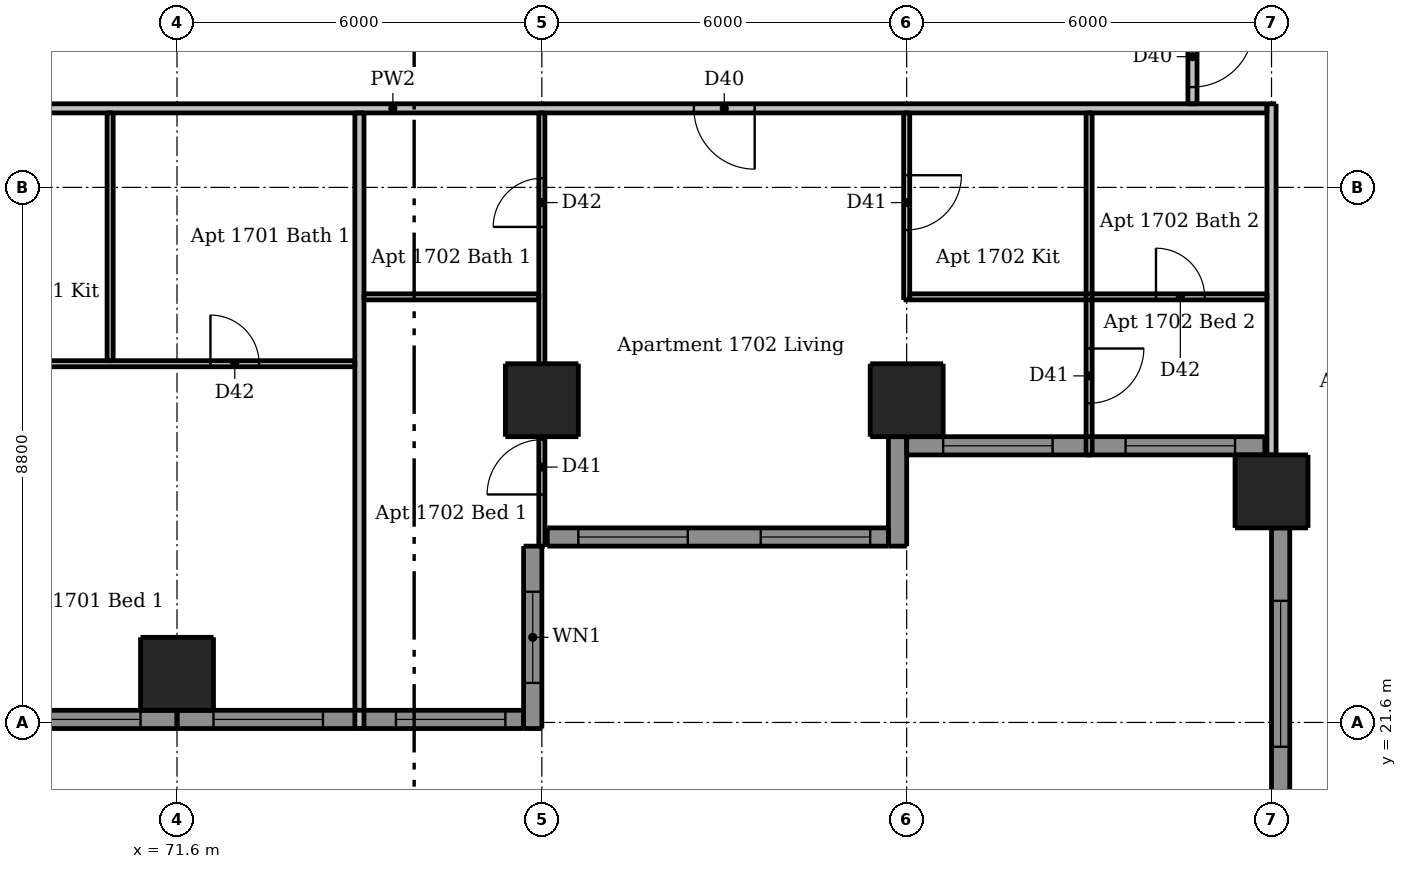
"""IFC4 building model, lengths in metres.
Left out: names, types, materials, properties, quantities, classifications, styles, units other than length and angle.
Written with IfcOpenShell. Run it as: python <this file> out.ifc"""

import sys

from ifc_helpers import new_model, si_unit, direction, frame, frame_2d, origin, origin_2d, place, context, subcontext, project, spatial, rectangle, extrude, element, fill, save


model = new_model("IFC4")
c1 = context("Model", 3, precision=1e-05, world=origin(), true_north=direction((0.0, 1.0)))
c2 = subcontext(c1, "Body", "Model", "MODEL_VIEW")
j1 = project(units=[si_unit("LENGTHUNIT", "METRE"), si_unit("PLANEANGLEUNIT", "RADIAN")], contexts=[c1])
p1 = place(None, origin())
s1 = spatial("IfcSite", under=j1, at=p1, CompositionType="ELEMENT")
p2 = place(p1, origin())
s2 = spatial("IfcBuilding", under=s1, at=p2, CompositionType="ELEMENT")
p3 = place(p2, frame((0.0, 0.0, 63.1)))
s3 = spatial("IfcBuildingStorey", under=s2, at=p3, CompositionType="ELEMENT", Elevation=63.1)
for number, where, z_axis, x_axis in (
    (1, (71.6, 22.4, 0.0), (0.0, 0.0, 1.0), (1.0, 0.0, 0.0)),
    (2, (77.6, 26.9, 0.0), (0.0, 0.0, 1.0), (1.0, 0.0, 0.0)),
    (3, (83.6, 26.9, 0.0), (0.0, 0.0, 1.0), (1.0, 0.0, 0.0)),
    (4, (89.6, 25.4, 0.0), (0.0, 0.0, 1.0), (1.0, 0.0, 0.0)),
):
    element("IfcColumn", number, at=place(p3, frame(where, z_axis=z_axis, x_axis=x_axis)), inside=s3, PredefinedType="COLUMN", context=c2, shape_type="SweptSolid", body=[
        extrude(rectangle(XDim=1.2, YDim=1.2, at=origin_2d()), origin(), (0.0, 0.0, 1.0), 3.05),
    ])
p4 = place(p3, frame((77.45, 21.5, 0.0), z_axis=(0.0, 0.0, 1.0), x_axis=(0.0, 1.0, 0.0)))
e5 = element("IfcWall", 5, at=p4, inside=s3, PredefinedType="SOLIDWALL", context=c2, shape_type="SweptSolid", body=[
    extrude(rectangle(XDim=3.0, YDim=0.3, at=frame_2d((1.5, 0.0))), origin(), (0.0, 0.0, 1.0), 3.05),
])
p5 = place(p4, frame((0.75, 0.0, 0.9)))
e6 = element("IfcOpeningElement", 6, at=p5, cuts=e5, PredefinedType="OPENING", context=c2, shape_type="SweptSolid", body=[
    extrude(rectangle(XDim=1.5, YDim=1.5, at=frame_2d((0.75, 0.75))), frame((0.0, 0.16, 0.0), z_axis=(0.0, -1.0, 0.0), x_axis=(1.0, 0.0, 0.0)), (0.0, 0.0, 1.0), 0.32),
])
p6 = place(p3, frame((83.45, 24.5, 0.0), z_axis=(0.0, 0.0, 1.0), x_axis=(0.0, 1.0, 0.0)))
e7 = element("IfcWall", 7, at=p6, inside=s3, PredefinedType="SOLIDWALL", context=c2, shape_type="SweptSolid", body=[
    extrude(rectangle(XDim=1.8, YDim=0.3, at=frame_2d((0.9, 0.0))), origin(), (0.0, 0.0, 1.0), 3.05),
])
p7 = place(p3, frame((89.75, 24.8, 0.0), z_axis=(0.0, 0.0, 1.0), x_axis=(0.0, -1.0, 0.0)))
e8 = element("IfcWall", 8, at=p7, inside=s3, PredefinedType="SOLIDWALL", context=c2, shape_type="SweptSolid", body=[
    extrude(rectangle(XDim=4.8, YDim=0.3, at=frame_2d((2.4, 0.0))), origin(), (0.0, 0.0, 1.0), 3.05),
])
p8 = place(p7, frame((1.2, 0.0, 0.15)))
e9 = element("IfcOpeningElement", 9, at=p8, cuts=e8, PredefinedType="OPENING", context=c2, shape_type="SweptSolid", body=[
    extrude(rectangle(XDim=2.4, YDim=2.1, at=frame_2d((1.2, 1.05))), frame((0.0, 0.16, 0.0), z_axis=(0.0, -1.0, 0.0), x_axis=(1.0, 0.0, 0.0)), (0.0, 0.0, 1.0), 0.32),
])
p9 = place(p3, frame((65.6, 21.65, 0.0), z_axis=(0.0, 0.0, 1.0), x_axis=(1.0, 0.0, 0.0)))
e10 = element("IfcWall", 10, at=p9, inside=s3, PredefinedType="SOLIDWALL", context=c2, shape_type="SweptSolid", body=[
    extrude(rectangle(XDim=6.0, YDim=0.3, at=frame_2d((3.0, 0.0))), origin(), (0.0, 0.0, 1.0), 3.05),
])
p10 = place(p9, frame((0.6, 0.0, 0.15)))
e11 = element("IfcOpeningElement", 11, at=p10, cuts=e10, PredefinedType="OPENING", context=c2, shape_type="SweptSolid", body=[
    extrude(rectangle(XDim=1.8, YDim=2.1, at=frame_2d((0.9, 1.05))), frame((0.0, 0.16, 0.0), z_axis=(0.0, -1.0, 0.0), x_axis=(1.0, 0.0, 0.0)), (0.0, 0.0, 1.0), 0.32),
])
p11 = place(p9, frame((3.6, 0.0, 0.15)))
e12 = element("IfcOpeningElement", 12, at=p11, cuts=e10, PredefinedType="OPENING", context=c2, shape_type="SweptSolid", body=[
    extrude(rectangle(XDim=1.8, YDim=2.1, at=frame_2d((0.9, 1.05))), frame((0.0, 0.16, 0.0), z_axis=(0.0, -1.0, 0.0), x_axis=(1.0, 0.0, 0.0)), (0.0, 0.0, 1.0), 0.32),
])
p12 = place(p3, frame((71.6, 21.65, 0.0), z_axis=(0.0, 0.0, 1.0), x_axis=(1.0, 0.0, 0.0)))
e13 = element("IfcWall", 13, at=p12, inside=s3, PredefinedType="SOLIDWALL", context=c2, shape_type="SweptSolid", body=[
    extrude(rectangle(XDim=5.7, YDim=0.3, at=frame_2d((2.85, 0.0))), origin(), (0.0, 0.0, 1.0), 3.05),
])
p13 = place(p12, frame((0.6, 0.0, 0.15)))
e14 = element("IfcOpeningElement", 14, at=p13, cuts=e13, PredefinedType="OPENING", context=c2, shape_type="SweptSolid", body=[
    extrude(rectangle(XDim=1.8, YDim=2.1, at=frame_2d((0.9, 1.05))), frame((0.0, 0.16, 0.0), z_axis=(0.0, -1.0, 0.0), x_axis=(1.0, 0.0, 0.0)), (0.0, 0.0, 1.0), 0.32),
])
p14 = place(p12, frame((3.6, 0.0, 0.15)))
e15 = element("IfcOpeningElement", 15, at=p14, cuts=e13, PredefinedType="OPENING", context=c2, shape_type="SweptSolid", body=[
    extrude(rectangle(XDim=1.8, YDim=2.1, at=frame_2d((0.9, 1.05))), frame((0.0, 0.16, 0.0), z_axis=(0.0, -1.0, 0.0), x_axis=(1.0, 0.0, 0.0)), (0.0, 0.0, 1.0), 0.32),
])
p15 = place(p3, frame((77.69, 24.65, 0.0), z_axis=(0.0, 0.0, 1.0), x_axis=(1.0, 0.0, 0.0)))
e16 = element("IfcWall", 16, at=p15, inside=s3, PredefinedType="SOLIDWALL", context=c2, shape_type="SweptSolid", body=[
    extrude(rectangle(XDim=5.61, YDim=0.3, at=frame_2d((2.805, 0.0))), origin(), (0.0, 0.0, 1.0), 3.05),
])
p16 = place(p15, frame((0.51, 0.0, 0.15)))
e17 = element("IfcOpeningElement", 17, at=p16, cuts=e16, PredefinedType="OPENING", context=c2, shape_type="SweptSolid", body=[
    extrude(rectangle(XDim=1.8, YDim=2.1, at=frame_2d((0.9, 1.05))), frame((0.0, 0.16, 0.0), z_axis=(0.0, -1.0, 0.0), x_axis=(1.0, 0.0, 0.0)), (0.0, 0.0, 1.0), 0.32),
])
p17 = place(p15, frame((3.51, 0.0, 0.15)))
e18 = element("IfcOpeningElement", 18, at=p17, cuts=e16, PredefinedType="OPENING", context=c2, shape_type="SweptSolid", body=[
    extrude(rectangle(XDim=1.8, YDim=2.1, at=frame_2d((0.9, 1.05))), frame((0.0, 0.16, 0.0), z_axis=(0.0, -1.0, 0.0), x_axis=(1.0, 0.0, 0.0)), (0.0, 0.0, 1.0), 0.32),
])
p18 = place(p3, frame((83.6, 26.15, 0.0), z_axis=(0.0, 0.0, 1.0), x_axis=(1.0, 0.0, 0.0)))
e19 = element("IfcWall", 19, at=p18, inside=s3, PredefinedType="SOLIDWALL", context=c2, shape_type="SweptSolid", body=[
    extrude(rectangle(XDim=5.89, YDim=0.3, at=frame_2d((2.945, 0.0))), origin(), (0.0, 0.0, 1.0), 3.05),
])
p19 = place(p18, frame((0.6, 0.0, 0.15)))
e20 = element("IfcOpeningElement", 20, at=p19, cuts=e19, PredefinedType="OPENING", context=c2, shape_type="SweptSolid", body=[
    extrude(rectangle(XDim=1.8, YDim=2.1, at=frame_2d((0.9, 1.05))), frame((0.0, 0.16, 0.0), z_axis=(0.0, -1.0, 0.0), x_axis=(1.0, 0.0, 0.0)), (0.0, 0.0, 1.0), 0.32),
])
p20 = place(p18, frame((3.6, 0.0, 0.15)))
e21 = element("IfcOpeningElement", 21, at=p20, cuts=e19, PredefinedType="OPENING", context=c2, shape_type="SweptSolid", body=[
    extrude(rectangle(XDim=1.8, YDim=2.1, at=frame_2d((0.9, 1.05))), frame((0.0, 0.16, 0.0), z_axis=(0.0, -1.0, 0.0), x_axis=(1.0, 0.0, 0.0)), (0.0, 0.0, 1.0), 0.32),
])
p21 = place(p3, frame((70.5, 27.55, 0.0), z_axis=(0.0, 0.0, 1.0), x_axis=(0.0, 1.0, 0.0)))
e22 = element("IfcWall", 22, at=p21, inside=s3, PredefinedType="PARTITIONING", context=c2, shape_type="SweptSolid", body=[
    extrude(rectangle(XDim=4.075, YDim=0.1, at=frame_2d((2.038, 0.0))), origin(), (0.0, 0.0, 1.0), 3.05),
])
p22 = place(p3, frame((77.6, 24.5, 0.0), z_axis=(0.0, 0.0, 1.0), x_axis=(0.0, 1.0, 0.0)))
e23 = element("IfcWall", 23, at=p22, inside=s3, PredefinedType="PARTITIONING", context=c2, shape_type="SweptSolid", body=[
    extrude(rectangle(XDim=7.125, YDim=0.1, at=frame_2d((3.562, 0.0))), origin(), (0.0, 0.0, 1.0), 2.59),
])
p23 = place(p22, frame((0.85, 0.0, 0.0)))
e24 = element("IfcOpeningElement", 24, at=p23, cuts=e23, PredefinedType="OPENING", context=c2, shape_type="SweptSolid", body=[
    extrude(rectangle(XDim=0.9, YDim=2.1, at=frame_2d((0.45, 1.05))), frame((0.0, 0.06, 0.0), z_axis=(0.0, -1.0, 0.0), x_axis=(1.0, 0.0, 0.0)), (0.0, 0.0, 1.0), 0.12),
])
p24 = place(p22, frame((5.25, 0.0, 0.0)))
e25 = element("IfcOpeningElement", 25, at=p24, cuts=e23, PredefinedType="OPENING", context=c2, shape_type="SweptSolid", body=[
    extrude(rectangle(XDim=0.8, YDim=2.1, at=frame_2d((0.4, 1.05))), frame((0.0, 0.06, 0.0), z_axis=(0.0, -1.0, 0.0), x_axis=(1.0, 0.0, 0.0)), (0.0, 0.0, 1.0), 0.12),
])
p25 = place(p3, frame((83.6, 31.625, 0.0), z_axis=(0.0, 0.0, 1.0), x_axis=(0.0, -1.0, 0.0)))
e26 = element("IfcWall", 26, at=p25, inside=s3, PredefinedType="PARTITIONING", context=c2, shape_type="SweptSolid", body=[
    extrude(rectangle(XDim=3.075, YDim=0.1, at=frame_2d((1.538, 0.0))), origin(), (0.0, 0.0, 1.0), 2.647),
])
p26 = place(p25, frame((1.025, 0.0, 0.0)))
e27 = element("IfcOpeningElement", 27, at=p26, cuts=e26, PredefinedType="OPENING", context=c2, shape_type="SweptSolid", body=[
    extrude(rectangle(XDim=0.9, YDim=2.1, at=frame_2d((0.45, 1.05))), frame((0.0, 0.06, 0.0), z_axis=(0.0, -1.0, 0.0), x_axis=(1.0, 0.0, 0.0)), (0.0, 0.0, 1.0), 0.12),
])
p27 = place(p3, frame((86.6, 31.625, 0.0), z_axis=(0.0, 0.0, 1.0), x_axis=(0.0, -1.0, 0.0)))
e28 = element("IfcWall", 28, at=p27, inside=s3, PredefinedType="PARTITIONING", context=c2, shape_type="SweptSolid", body=[
    extrude(rectangle(XDim=5.625, YDim=0.1, at=frame_2d((2.812, 0.0))), origin(), (0.0, 0.0, 1.0), 3.05),
])
p28 = place(p27, frame((3.875, 0.0, 0.0)))
e29 = element("IfcOpeningElement", 29, at=p28, cuts=e28, PredefinedType="OPENING", context=c2, shape_type="SweptSolid", body=[
    extrude(rectangle(XDim=0.9, YDim=2.1, at=frame_2d((0.45, 1.05))), frame((0.0, 0.06, 0.0), z_axis=(0.0, -1.0, 0.0), x_axis=(1.0, 0.0, 0.0)), (0.0, 0.0, 1.0), 0.12),
])
p29 = place(p3, frame((74.675, 28.6, 0.0), z_axis=(0.0, 0.0, 1.0), x_axis=(1.0, 0.0, 0.0)))
e30 = element("IfcWall", 30, at=p29, inside=s3, PredefinedType="PARTITIONING", context=c2, shape_type="SweptSolid", body=[
    extrude(rectangle(XDim=2.875, YDim=0.1, at=frame_2d((1.438, 0.0))), origin(), (0.0, 0.0, 1.0), 3.05),
])
p30 = place(p3, frame((83.65, 28.6, 0.0), z_axis=(0.0, 0.0, 1.0), x_axis=(1.0, 0.0, 0.0)))
e31 = element("IfcWall", 31, at=p30, inside=s3, PredefinedType="PARTITIONING", context=c2, shape_type="SweptSolid", body=[
    extrude(rectangle(XDim=5.875, YDim=0.1, at=frame_2d((2.938, 0.0))), origin(), (0.0, 0.0, 1.0), 3.05),
])
p31 = place(p30, frame((4.05, 0.0, 0.0)))
e32 = element("IfcOpeningElement", 32, at=p31, cuts=e31, PredefinedType="OPENING", context=c2, shape_type="SweptSolid", body=[
    extrude(rectangle(XDim=0.8, YDim=2.1, at=frame_2d((0.4, 1.05))), frame((0.0, 0.06, 0.0), z_axis=(0.0, -1.0, 0.0), x_axis=(1.0, 0.0, 0.0)), (0.0, 0.0, 1.0), 0.12),
])
p32 = place(p3, frame((68.15, 27.5, 0.0), z_axis=(0.0, 0.0, 1.0), x_axis=(1.0, 0.0, 0.0)))
e33 = element("IfcWall", 33, at=p32, inside=s3, PredefinedType="PARTITIONING", context=c2, shape_type="SweptSolid", body=[
    extrude(rectangle(XDim=6.375, YDim=0.1, at=frame_2d((3.188, 0.0))), origin(), (0.0, 0.0, 1.0), 3.05),
])
p33 = place(p32, frame((4.0, 0.0, 0.0)))
e34 = element("IfcOpeningElement", 34, at=p33, cuts=e33, PredefinedType="OPENING", context=c2, shape_type="SweptSolid", body=[
    extrude(rectangle(XDim=0.8, YDim=2.1, at=frame_2d((0.4, 1.05))), frame((0.0, 0.06, 0.0), z_axis=(0.0, -1.0, 0.0), x_axis=(1.0, 0.0, 0.0)), (0.0, 0.0, 1.0), 0.12),
])
p34 = place(p3, frame((74.6, 21.5, 0.0), z_axis=(0.0, 0.0, 1.0), x_axis=(0.0, 1.0, 0.0)))
e35 = element("IfcWall", 35, at=p34, inside=s3, PredefinedType="PARTITIONING", context=c2, shape_type="SweptSolid", body=[
    extrude(rectangle(XDim=10.125, YDim=0.15, at=frame_2d((5.062, 0.0))), origin(), (0.0, 0.0, 1.0), 3.05),
])
p35 = place(p3, frame((88.3, 60.475, 0.0), z_axis=(0.0, 0.0, 1.0), x_axis=(0.0, -1.0, 0.0)))
e36 = element("IfcWall", 36, at=p35, inside=s3, PredefinedType="PARTITIONING", context=c2, shape_type="SweptSolid", body=[
    extrude(rectangle(XDim=28.7, YDim=0.15, at=frame_2d((14.35, 0.0))), origin(), (0.0, 0.0, 1.0), 3.05),
])
p36 = place(p35, frame((27.425, 0.0, 0.0)))
e37 = element("IfcOpeningElement", 37, at=p36, cuts=e36, PredefinedType="OPENING", context=c2, shape_type="SweptSolid", body=[
    extrude(rectangle(XDim=1.0, YDim=2.1, at=frame_2d((0.5, 1.05))), frame((0.0, 0.085, 0.0), z_axis=(0.0, -1.0, 0.0), x_axis=(1.0, 0.0, 0.0)), (0.0, 0.0, 1.0), 0.17),
])
p37 = place(p35, frame((14.525, 0.0, 0.0)))
e38 = element("IfcOpeningElement", 38, at=p37, cuts=e36, PredefinedType="OPENING", context=c2, shape_type="SweptSolid", body=[
    extrude(rectangle(XDim=1.0, YDim=2.1, at=frame_2d((0.5, 1.05))), frame((0.0, 0.085, 0.0), z_axis=(0.0, -1.0, 0.0), x_axis=(1.0, 0.0, 0.0)), (0.0, 0.0, 1.0), 0.17),
])
p38 = place(p35, frame((3.775, 0.0, 0.0)))
e39 = element("IfcOpeningElement", 39, at=p38, cuts=e36, PredefinedType="OPENING", context=c2, shape_type="SweptSolid", body=[
    extrude(rectangle(XDim=1.0, YDim=2.1, at=frame_2d((0.5, 1.05))), frame((0.0, 0.085, 0.0), z_axis=(0.0, -1.0, 0.0), x_axis=(1.0, 0.0, 0.0)), (0.0, 0.0, 1.0), 0.17),
])
p39 = place(p3, frame((89.6, 26.0, 0.0), z_axis=(0.0, 0.0, 1.0), x_axis=(0.0, 1.0, 0.0)))
e40 = element("IfcWall", 40, at=p39, inside=s3, PredefinedType="PARTITIONING", context=c2, shape_type="SweptSolid", body=[
    extrude(rectangle(XDim=5.775, YDim=0.15, at=frame_2d((2.887, 0.0))), origin(), (0.0, 0.0, 1.0), 2.516),
])
p40 = place(p3, frame((89.525, 31.7, 0.0), z_axis=(0.0, 0.0, 1.0), x_axis=(-1.0, 0.0, 0.0)))
e41 = element("IfcWall", 41, at=p40, inside=s3, PredefinedType="PARTITIONING", context=c2, shape_type="SweptSolid", body=[
    extrude(rectangle(XDim=28.75, YDim=0.15, at=frame_2d((14.375, 0.0))), origin(), (0.0, 0.0, 1.0), 3.05),
])
p41 = place(p40, frame((24.625, 0.0, 0.0)))
e42 = element("IfcOpeningElement", 42, at=p41, cuts=e41, PredefinedType="OPENING", context=c2, shape_type="SweptSolid", body=[
    extrude(rectangle(XDim=1.0, YDim=2.1, at=frame_2d((0.5, 1.05))), frame((0.0, 0.085, 0.0), z_axis=(0.0, -1.0, 0.0), x_axis=(1.0, 0.0, 0.0)), (0.0, 0.0, 1.0), 0.17),
])
p42 = place(p40, frame((8.425, 0.0, 0.0)))
e43 = element("IfcOpeningElement", 43, at=p42, cuts=e41, PredefinedType="OPENING", context=c2, shape_type="SweptSolid", body=[
    extrude(rectangle(XDim=1.0, YDim=2.1, at=frame_2d((0.5, 1.05))), frame((0.0, 0.085, 0.0), z_axis=(0.0, -1.0, 0.0), x_axis=(1.0, 0.0, 0.0)), (0.0, 0.0, 1.0), 0.17),
])
p43 = place(p5, origin())
e44 = element("IfcWindow", 44, at=p43, inside=s3, PartitioningType="DOUBLE_PANEL_VERTICAL", PredefinedType="WINDOW", context=c2, shape_type="SweptSolid", body=[
    extrude(rectangle(XDim=1.5, YDim=1.5, at=frame_2d((0.75, 0.75))), frame((0.0, 0.03, 0.0), z_axis=(0.0, -1.0, 0.0), x_axis=(1.0, 0.0, 0.0)), (0.0, 0.0, 1.0), 0.06),
])
fill(e6, e44)
p44 = place(p8, origin())
e45 = element("IfcWindow", 45, at=p44, inside=s3, PartitioningType="DOUBLE_PANEL_VERTICAL", PredefinedType="WINDOW", context=c2, shape_type="SweptSolid", body=[
    extrude(rectangle(XDim=2.4, YDim=2.1, at=frame_2d((1.2, 1.05))), frame((0.0, 0.03, 0.0), z_axis=(0.0, -1.0, 0.0), x_axis=(1.0, 0.0, 0.0)), (0.0, 0.0, 1.0), 0.06),
])
fill(e9, e45)
p45 = place(p11, origin())
e46 = element("IfcWindow", 46, at=p45, inside=s3, PartitioningType="DOUBLE_PANEL_VERTICAL", PredefinedType="WINDOW", context=c2, shape_type="SweptSolid", body=[
    extrude(rectangle(XDim=1.8, YDim=2.1, at=frame_2d((0.9, 1.05))), frame((0.0, 0.03, 0.0), z_axis=(0.0, -1.0, 0.0), x_axis=(1.0, 0.0, 0.0)), (0.0, 0.0, 1.0), 0.06),
])
fill(e12, e46)
p46 = place(p13, origin())
e47 = element("IfcWindow", 47, at=p46, inside=s3, PartitioningType="DOUBLE_PANEL_VERTICAL", PredefinedType="WINDOW", context=c2, shape_type="SweptSolid", body=[
    extrude(rectangle(XDim=1.8, YDim=2.1, at=frame_2d((0.9, 1.05))), frame((0.0, 0.03, 0.0), z_axis=(0.0, -1.0, 0.0), x_axis=(1.0, 0.0, 0.0)), (0.0, 0.0, 1.0), 0.06),
])
fill(e14, e47)
p47 = place(p14, origin())
e48 = element("IfcWindow", 48, at=p47, inside=s3, PartitioningType="DOUBLE_PANEL_VERTICAL", PredefinedType="WINDOW", context=c2, shape_type="SweptSolid", body=[
    extrude(rectangle(XDim=1.8, YDim=2.1, at=frame_2d((0.9, 1.05))), frame((0.0, 0.03, 0.0), z_axis=(0.0, -1.0, 0.0), x_axis=(1.0, 0.0, 0.0)), (0.0, 0.0, 1.0), 0.06),
])
fill(e15, e48)
p48 = place(p16, origin())
e49 = element("IfcWindow", 49, at=p48, inside=s3, PartitioningType="DOUBLE_PANEL_VERTICAL", PredefinedType="WINDOW", context=c2, shape_type="SweptSolid", body=[
    extrude(rectangle(XDim=1.8, YDim=2.1, at=frame_2d((0.9, 1.05))), frame((0.0, 0.03, 0.0), z_axis=(0.0, -1.0, 0.0), x_axis=(1.0, 0.0, 0.0)), (0.0, 0.0, 1.0), 0.06),
])
fill(e17, e49)
p49 = place(p17, origin())
e50 = element("IfcWindow", 50, at=p49, inside=s3, PartitioningType="DOUBLE_PANEL_VERTICAL", PredefinedType="WINDOW", context=c2, shape_type="SweptSolid", body=[
    extrude(rectangle(XDim=1.8, YDim=2.1, at=frame_2d((0.9, 1.05))), frame((0.0, 0.03, 0.0), z_axis=(0.0, -1.0, 0.0), x_axis=(1.0, 0.0, 0.0)), (0.0, 0.0, 1.0), 0.06),
])
fill(e18, e50)
p50 = place(p19, origin())
e51 = element("IfcWindow", 51, at=p50, inside=s3, PartitioningType="DOUBLE_PANEL_VERTICAL", PredefinedType="WINDOW", context=c2, shape_type="SweptSolid", body=[
    extrude(rectangle(XDim=1.8, YDim=2.1, at=frame_2d((0.9, 1.05))), frame((0.0, 0.03, 0.0), z_axis=(0.0, -1.0, 0.0), x_axis=(1.0, 0.0, 0.0)), (0.0, 0.0, 1.0), 0.06),
])
fill(e20, e51)
p51 = place(p20, origin())
e52 = element("IfcWindow", 52, at=p51, inside=s3, PartitioningType="DOUBLE_PANEL_VERTICAL", PredefinedType="WINDOW", context=c2, shape_type="SweptSolid", body=[
    extrude(rectangle(XDim=1.8, YDim=2.1, at=frame_2d((0.9, 1.05))), frame((0.0, 0.03, 0.0), z_axis=(0.0, -1.0, 0.0), x_axis=(1.0, 0.0, 0.0)), (0.0, 0.0, 1.0), 0.06),
])
fill(e21, e52)
p52 = place(p33, origin())
e53 = element("IfcDoor", 53, at=p52, inside=s3, OperationType="SINGLE_SWING_LEFT", PredefinedType="DOOR", context=c2, shape_type="SweptSolid", body=[
    extrude(rectangle(XDim=0.8, YDim=2.1, at=frame_2d((0.4, 1.05))), frame((0.0, 0.025, 0.0), z_axis=(0.0, -1.0, 0.0), x_axis=(1.0, 0.0, 0.0)), (0.0, 0.0, 1.0), 0.05),
])
fill(e34, e53)
p53 = place(p42, origin())
e54 = element("IfcDoor", 54, at=p53, inside=s3, OperationType="SINGLE_SWING_LEFT", PredefinedType="DOOR", context=c2, shape_type="SweptSolid", body=[
    extrude(rectangle(XDim=1.0, YDim=2.1, at=frame_2d((0.5, 1.05))), frame((0.0, 0.025, 0.0), z_axis=(0.0, -1.0, 0.0), x_axis=(1.0, 0.0, 0.0)), (0.0, 0.0, 1.0), 0.05),
])
fill(e43, e54)
p54 = place(p26, origin())
e55 = element("IfcDoor", 55, at=p54, inside=s3, OperationType="SINGLE_SWING_LEFT", PredefinedType="DOOR", context=c2, shape_type="SweptSolid", body=[
    extrude(rectangle(XDim=0.9, YDim=2.1, at=frame_2d((0.45, 1.05))), frame((0.0, 0.025, 0.0), z_axis=(0.0, -1.0, 0.0), x_axis=(1.0, 0.0, 0.0)), (0.0, 0.0, 1.0), 0.05),
])
fill(e27, e55)
p55 = place(p23, origin())
e56 = element("IfcDoor", 56, at=p55, inside=s3, OperationType="SINGLE_SWING_LEFT", PredefinedType="DOOR", context=c2, shape_type="SweptSolid", body=[
    extrude(rectangle(XDim=0.9, YDim=2.1, at=frame_2d((0.45, 1.05))), frame((0.0, 0.025, 0.0), z_axis=(0.0, -1.0, 0.0), x_axis=(1.0, 0.0, 0.0)), (0.0, 0.0, 1.0), 0.05),
])
fill(e24, e56)
p56 = place(p24, origin())
e57 = element("IfcDoor", 57, at=p56, inside=s3, OperationType="SINGLE_SWING_LEFT", PredefinedType="DOOR", context=c2, shape_type="SweptSolid", body=[
    extrude(rectangle(XDim=0.8, YDim=2.1, at=frame_2d((0.4, 1.05))), frame((0.0, 0.025, 0.0), z_axis=(0.0, -1.0, 0.0), x_axis=(1.0, 0.0, 0.0)), (0.0, 0.0, 1.0), 0.05),
])
fill(e25, e57)
p57 = place(p28, origin())
e58 = element("IfcDoor", 58, at=p57, inside=s3, OperationType="SINGLE_SWING_LEFT", PredefinedType="DOOR", context=c2, shape_type="SweptSolid", body=[
    extrude(rectangle(XDim=0.9, YDim=2.1, at=frame_2d((0.45, 1.05))), frame((0.0, 0.025, 0.0), z_axis=(0.0, -1.0, 0.0), x_axis=(1.0, 0.0, 0.0)), (0.0, 0.0, 1.0), 0.05),
])
fill(e29, e58)
p58 = place(p31, origin())
e59 = element("IfcDoor", 59, at=p58, inside=s3, OperationType="SINGLE_SWING_LEFT", PredefinedType="DOOR", context=c2, shape_type="SweptSolid", body=[
    extrude(rectangle(XDim=0.8, YDim=2.1, at=frame_2d((0.4, 1.05))), frame((0.0, 0.025, 0.0), z_axis=(0.0, -1.0, 0.0), x_axis=(1.0, 0.0, 0.0)), (0.0, 0.0, 1.0), 0.05),
])
fill(e32, e59)
p59 = place(p36, origin())
e60 = element("IfcDoor", 60, at=p59, inside=s3, OperationType="SINGLE_SWING_LEFT", PredefinedType="DOOR", context=c2, shape_type="SweptSolid", body=[
    extrude(rectangle(XDim=1.0, YDim=2.1, at=frame_2d((0.5, 1.05))), frame((0.0, 0.025, 0.0), z_axis=(0.0, -1.0, 0.0), x_axis=(1.0, 0.0, 0.0)), (0.0, 0.0, 1.0), 0.05),
])
fill(e37, e60)
save(model, sys.argv[1])
